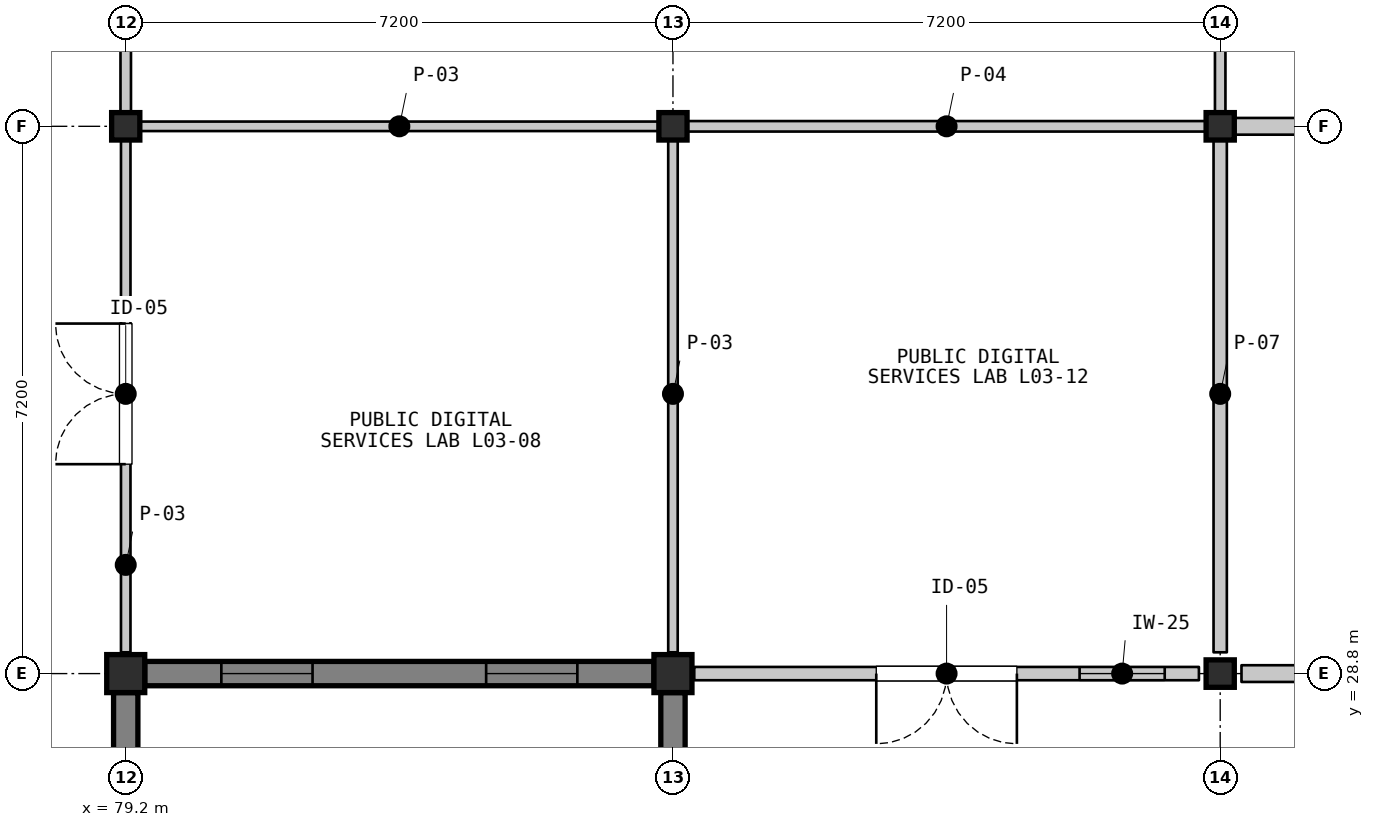
"""IFC4 building model, lengths in metres.
Left out: names, types, materials, properties, quantities, classifications, styles, units other than length and angle.
Written with IfcOpenShell. Run it as: python <this file> out.ifc"""

import sys

from ifc_helpers import new_model, si_unit, direction, frame, frame_2d, origin, origin_2d, place, context, subcontext, project, spatial, rectangle, i_section, extrude, element, fill, save


model = new_model("IFC4")
c1 = context("Model", 3, precision=1e-05, world=origin(), true_north=direction((0.0, 1.0)))
c2 = subcontext(c1, "Body", "Model", "MODEL_VIEW")
j1 = project(units=[si_unit("LENGTHUNIT", "METRE"), si_unit("PLANEANGLEUNIT", "RADIAN")], contexts=[c1])
p1 = place(None, origin())
s1 = spatial("IfcSite", under=j1, at=p1, CompositionType="ELEMENT")
p2 = place(p1, origin())
s2 = spatial("IfcBuilding", under=s1, at=p2, CompositionType="ELEMENT")
p3 = place(p2, frame((0.0, 0.0, 9.9)))
s3 = spatial("IfcBuildingStorey", under=s2, at=p3, CompositionType="ELEMENT", Elevation=9.9)
p4 = place(p3, frame((79.2, 28.8, 0.0), z_axis=(0.0, 0.0, 1.0), x_axis=(1.0, 0.0, 0.0)))
e1 = element("IfcColumn", 1, at=p4, inside=s3, PredefinedType="COLUMN", context=c2, shape_type="SweptSolid", body=[
    extrude(rectangle(XDim=0.5, YDim=0.5, at=origin_2d()), origin(), (0.0, 0.0, 1.0), 4.2),
])
p5 = place(p3, frame((79.2, 36.0, 0.0), z_axis=(0.0, 0.0, 1.0), x_axis=(1.0, 0.0, 0.0)))
e2 = element("IfcColumn", 2, at=p5, inside=s3, PredefinedType="COLUMN", context=c2, shape_type="SweptSolid", body=[
    extrude(i_section(OverallWidth=0.371, OverallDepth=0.361, WebThickness=0.012, FlangeThickness=0.02, FilletRadius=0.015, at=origin_2d()), origin(), (0.0, 0.0, 1.0), 4.2),
])
p6 = place(p3, frame((86.4, 28.8, 0.0), z_axis=(0.0, 0.0, 1.0), x_axis=(1.0, 0.0, 0.0)))
e3 = element("IfcColumn", 3, at=p6, inside=s3, PredefinedType="COLUMN", context=c2, shape_type="SweptSolid", body=[
    extrude(rectangle(XDim=0.5, YDim=0.5, at=origin_2d()), origin(), (0.0, 0.0, 1.0), 4.2),
])
for number, where, z_axis, x_axis in (
    (4, (86.4, 36.0, 0.0), (0.0, 0.0, 1.0), (1.0, 0.0, 0.0)),
    (5, (93.6, 28.8, 0.0), (0.0, 0.0, 1.0), (1.0, 0.0, 0.0)),
    (6, (93.6, 36.0, 0.0), (0.0, 0.0, 1.0), (1.0, 0.0, 0.0)),
):
    element("IfcColumn", number, at=place(p3, frame(where, z_axis=z_axis, x_axis=x_axis)), inside=s3, PredefinedType="COLUMN", context=c2, shape_type="SweptSolid", body=[
        extrude(i_section(OverallWidth=0.371, OverallDepth=0.361, WebThickness=0.012, FlangeThickness=0.02, FilletRadius=0.015, at=origin_2d()), origin(), (0.0, 0.0, 1.0), 4.2),
    ])
p7 = place(p3, frame((79.2, 28.55, 0.0), z_axis=(0.0, 0.0, 1.0), x_axis=(0.0, -1.0, 0.0)))
e7 = element("IfcWall", 7, at=p7, inside=s3, PredefinedType="SOLIDWALL", context=c2, shape_type="SweptSolid", body=[
    extrude(rectangle(XDim=6.7, YDim=0.32, at=frame_2d((3.35, 0.0))), origin(), (0.0, 0.0, 1.0), 3.487),
])
p8 = place(p3, frame((86.15, 28.8, 0.0), z_axis=(0.0, 0.0, 1.0), x_axis=(-1.0, 0.0, 0.0)))
e8 = element("IfcWall", 8, at=p8, inside=s3, PredefinedType="SOLIDWALL", context=c2, shape_type="SweptSolid", body=[
    extrude(rectangle(XDim=6.7, YDim=0.32, at=frame_2d((3.35, 0.0))), origin(), (0.0, 0.0, 1.0), 3.418),
])
p9 = place(p8, frame((1.008, 0.0, 0.95)))
e9 = element("IfcOpeningElement", 9, at=p9, cuts=e8, PredefinedType="OPENING", context=c2, shape_type="SweptSolid", body=[
    extrude(rectangle(XDim=1.2, YDim=1.7, at=frame_2d((0.6, 0.85))), frame((0.0, 0.17, 0.0), z_axis=(0.0, -1.0, 0.0), x_axis=(1.0, 0.0, 0.0)), (0.0, 0.0, 1.0), 0.34),
])
p10 = place(p8, frame((4.492, 0.0, 0.95)))
e10 = element("IfcOpeningElement", 10, at=p10, cuts=e8, PredefinedType="OPENING", context=c2, shape_type="SweptSolid", body=[
    extrude(rectangle(XDim=1.2, YDim=1.7, at=frame_2d((0.6, 0.85))), frame((0.0, 0.17, 0.0), z_axis=(0.0, -1.0, 0.0), x_axis=(1.0, 0.0, 0.0)), (0.0, 0.0, 1.0), 0.34),
])
p11 = place(p3, frame((86.4, 21.85, 0.0), z_axis=(0.0, 0.0, 1.0), x_axis=(0.0, 1.0, 0.0)))
e11 = element("IfcWall", 11, at=p11, inside=s3, PredefinedType="SOLIDWALL", context=c2, shape_type="SweptSolid", body=[
    extrude(rectangle(XDim=6.7, YDim=0.32, at=frame_2d((3.35, 0.0))), origin(), (0.0, 0.0, 1.0), 3.487),
])
p12 = place(p3, frame((79.2, 29.08, 0.0), z_axis=(0.0, 0.0, 1.0), x_axis=(0.0, 1.0, 0.0)))
e12 = element("IfcWall", 12, at=p12, inside=s3, PredefinedType="PARTITIONING", context=c2, shape_type="SweptSolid", body=[
    extrude(rectangle(XDim=6.8, YDim=0.125, at=frame_2d((3.4, 0.0))), origin(), (0.0, 0.0, 1.0), 3.408),
])
p13 = place(p12, frame((2.475, 0.0, 0.0)))
e13 = element("IfcOpeningElement", 13, at=p13, cuts=e12, PredefinedType="OPENING", context=c2, shape_type="SweptSolid", body=[
    extrude(rectangle(XDim=1.85, YDim=2.45, at=frame_2d((0.925, 1.225))), frame((0.0, 0.073, 0.0), z_axis=(0.0, -1.0, 0.0), x_axis=(1.0, 0.0, 0.0)), (0.0, 0.0, 1.0), 0.145),
])
p14 = place(p3, frame((79.32, 36.0, 0.0), z_axis=(0.0, 0.0, 1.0), x_axis=(1.0, 0.0, 0.0)))
e14 = element("IfcWall", 14, at=p14, inside=s3, PredefinedType="PARTITIONING", context=c2, shape_type="SweptSolid", body=[
    extrude(rectangle(XDim=6.96, YDim=0.125, at=frame_2d((3.48, 0.0))), origin(), (0.0, 0.0, 1.0), 3.408),
])
p15 = place(p3, frame((86.4, 35.88, 0.0), z_axis=(0.0, 0.0, 1.0), x_axis=(0.0, -1.0, 0.0)))
e15 = element("IfcWall", 15, at=p15, inside=s3, PredefinedType="PARTITIONING", context=c2, shape_type="SweptSolid", body=[
    extrude(rectangle(XDim=6.8, YDim=0.125, at=frame_2d((3.4, 0.0))), origin(), (0.0, 0.0, 1.0), 3.408),
])
p16 = place(p3, frame((93.48, 36.0, 0.0), z_axis=(0.0, 0.0, 1.0), x_axis=(-1.0, 0.0, 0.0)))
e16 = element("IfcWall", 16, at=p16, inside=s3, PredefinedType="PARTITIONING", context=c2, shape_type="SweptSolid", body=[
    extrude(rectangle(XDim=6.96, YDim=0.138, at=frame_2d((3.48, 0.0))), origin(), (0.0, 0.0, 1.0), 3.408),
])
for number, where, z_axis, x_axis in (
    (17, (79.2, 36.12, 0.0), (0.0, 0.0, 1.0), (0.0, 1.0, 0.0)),
    (18, (93.6, 42.92, 0.0), (0.0, 0.0, 1.0), (0.0, -1.0, 0.0)),
):
    element("IfcWall", number, at=place(p3, frame(where, z_axis=z_axis, x_axis=x_axis)), inside=s3, PredefinedType="PARTITIONING", context=c2, shape_type="SweptSolid", body=[
        extrude(rectangle(XDim=6.8, YDim=0.138, at=frame_2d((3.4, 0.0))), origin(), (0.0, 0.0, 1.0), 3.408),
    ])
p17 = place(p3, frame((93.32, 28.8, 0.0), z_axis=(0.0, 0.0, 1.0), x_axis=(-1.0, 0.0, 0.0)))
e19 = element("IfcWall", 19, at=p17, inside=s3, PredefinedType="PARTITIONING", context=c2, shape_type="SweptSolid", body=[
    extrude(rectangle(XDim=6.64, YDim=0.175, at=frame_2d((3.32, 0.0))), origin(), (0.0, 0.0, 1.0), 3.408),
])
p18 = place(p17, frame((2.395, 0.0, 0.0)))
e20 = element("IfcOpeningElement", 20, at=p18, cuts=e19, PredefinedType="OPENING", context=c2, shape_type="SweptSolid", body=[
    extrude(rectangle(XDim=1.85, YDim=2.45, at=frame_2d((0.925, 1.225))), frame((0.0, 0.097, 0.0), z_axis=(0.0, -1.0, 0.0), x_axis=(1.0, 0.0, 0.0)), (0.0, 0.0, 1.0), 0.195),
])
p19 = place(p17, frame((0.45, 0.0, 1.05)))
e21 = element("IfcOpeningElement", 21, at=p19, cuts=e19, PredefinedType="OPENING", context=c2, shape_type="SweptSolid", body=[
    extrude(rectangle(XDim=1.12, YDim=0.92, at=frame_2d((0.56, 0.46))), frame((0.0, 0.097, 0.0), z_axis=(0.0, -1.0, 0.0), x_axis=(1.0, 0.0, 0.0)), (0.0, 0.0, 1.0), 0.195),
])
p20 = place(p3, frame((93.6, 35.88, 0.0), z_axis=(0.0, 0.0, 1.0), x_axis=(0.0, -1.0, 0.0)))
e22 = element("IfcWall", 22, at=p20, inside=s3, PredefinedType="PARTITIONING", context=c2, shape_type="SweptSolid", body=[
    extrude(rectangle(XDim=6.8, YDim=0.175, at=frame_2d((3.4, 0.0))), origin(), (0.0, 0.0, 1.0), 3.408),
])
p21 = place(p3, frame((100.68, 28.8, 0.0), z_axis=(0.0, 0.0, 1.0), x_axis=(-1.0, 0.0, 0.0)))
e23 = element("IfcWall", 23, at=p21, inside=s3, PredefinedType="PARTITIONING", context=c2, shape_type="SweptSolid", body=[
    extrude(rectangle(XDim=6.8, YDim=0.22, at=frame_2d((3.4, 0.0))), origin(), (0.0, 0.0, 1.0), 3.408),
])
p22 = place(p21, frame((2.625, 0.0, 0.0)))
e24 = element("IfcOpeningElement", 24, at=p22, cuts=e23, PredefinedType="OPENING", context=c2, shape_type="SweptSolid", body=[
    extrude(rectangle(XDim=1.55, YDim=2.3, at=frame_2d((0.775, 1.15))), frame((0.0, 0.12, 0.0), z_axis=(0.0, -1.0, 0.0), x_axis=(1.0, 0.0, 0.0)), (0.0, 0.0, 1.0), 0.24),
])
p23 = place(p21, frame((0.45, 0.0, 1.05)))
e25 = element("IfcOpeningElement", 25, at=p23, cuts=e23, PredefinedType="OPENING", context=c2, shape_type="SweptSolid", body=[
    extrude(rectangle(XDim=1.42, YDim=0.96, at=frame_2d((0.71, 0.48))), frame((0.0, 0.12, 0.0), z_axis=(0.0, -1.0, 0.0), x_axis=(1.0, 0.0, 0.0)), (0.0, 0.0, 1.0), 0.24),
])
p24 = place(p3, frame((93.72, 36.0, 0.0), z_axis=(0.0, 0.0, 1.0), x_axis=(1.0, 0.0, 0.0)))
e26 = element("IfcWall", 26, at=p24, inside=s3, PredefinedType="PARTITIONING", context=c2, shape_type="SweptSolid", body=[
    extrude(rectangle(XDim=6.96, YDim=0.22, at=frame_2d((3.48, 0.0))), origin(), (0.0, 0.0, 1.0), 3.408),
])
p25 = place(p9, origin())
e27 = element("IfcWindow", 27, at=p25, inside=s3, PartitioningType="SINGLE_PANEL", PredefinedType="WINDOW", context=c2, shape_type="SweptSolid", body=[
    extrude(rectangle(XDim=1.2, YDim=1.7, at=frame_2d((0.6, 0.85))), frame((0.0, 0.03, 0.0), z_axis=(0.0, -1.0, 0.0), x_axis=(1.0, 0.0, 0.0)), (0.0, 0.0, 1.0), 0.06),
])
fill(e9, e27)
p26 = place(p10, origin())
e28 = element("IfcWindow", 28, at=p26, inside=s3, PartitioningType="SINGLE_PANEL", PredefinedType="WINDOW", context=c2, shape_type="SweptSolid", body=[
    extrude(rectangle(XDim=1.2, YDim=1.7, at=frame_2d((0.6, 0.85))), frame((0.0, 0.03, 0.0), z_axis=(0.0, -1.0, 0.0), x_axis=(1.0, 0.0, 0.0)), (0.0, 0.0, 1.0), 0.06),
])
fill(e10, e28)
p27 = place(p13, origin())
e29 = element("IfcDoor", 29, at=p27, inside=s3, OperationType="DOUBLE_DOOR_SINGLE_SWING", PredefinedType="DOOR", context=c2, shape_type="SweptSolid", body=[
    extrude(rectangle(XDim=1.85, YDim=2.45, at=frame_2d((0.925, 1.225))), frame((0.0, 0.025, 0.0), z_axis=(0.0, -1.0, 0.0), x_axis=(1.0, 0.0, 0.0)), (0.0, 0.0, 1.0), 0.05),
])
fill(e13, e29)
p28 = place(p18, origin())
e30 = element("IfcDoor", 30, at=p28, inside=s3, OperationType="DOUBLE_DOOR_SINGLE_SWING", PredefinedType="DOOR", context=c2, shape_type="SweptSolid", body=[
    extrude(rectangle(XDim=1.85, YDim=2.45, at=frame_2d((0.925, 1.225))), frame((0.0, 0.025, 0.0), z_axis=(0.0, -1.0, 0.0), x_axis=(1.0, 0.0, 0.0)), (0.0, 0.0, 1.0), 0.05),
])
fill(e20, e30)
p29 = place(p19, origin())
e31 = element("IfcWindow", 31, at=p29, inside=s3, PartitioningType="SINGLE_PANEL", PredefinedType="WINDOW", context=c2, shape_type="SweptSolid", body=[
    extrude(rectangle(XDim=1.12, YDim=0.92, at=frame_2d((0.56, 0.46))), frame((0.0, 0.03, 0.0), z_axis=(0.0, -1.0, 0.0), x_axis=(1.0, 0.0, 0.0)), (0.0, 0.0, 1.0), 0.06),
])
fill(e21, e31)
save(model, sys.argv[1])
